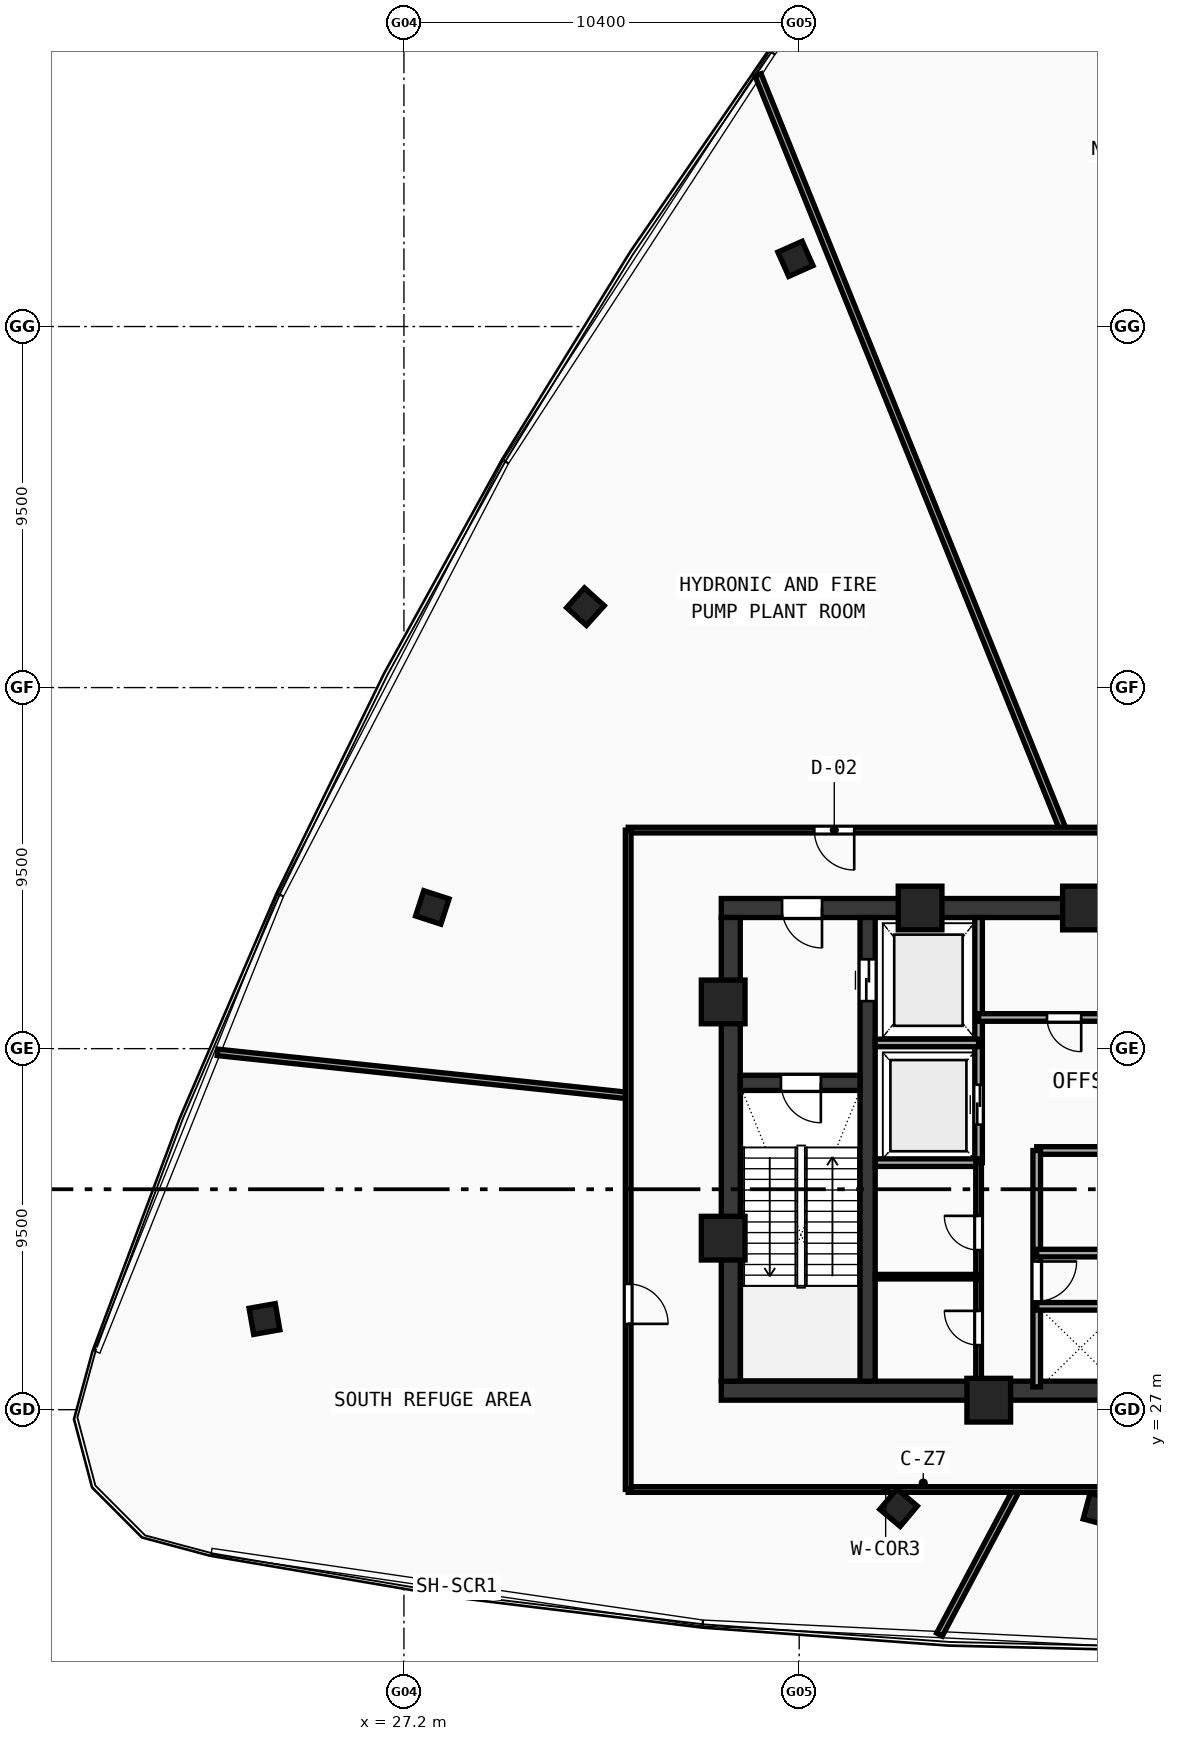
"""IFC4 building model, lengths in metres.
Left out: names, types, materials, properties, quantities, classifications, styles, units other than length and angle.
Written with IfcOpenShell. Run it as: python <this file> out.ifc"""

import sys

from ifc_helpers import new_model, si_unit, direction, frame, frame_2d, origin, origin_with_axes, origin_2d, place, context, subcontext, project, spatial, rectangle, hollow_rectangle, extrude, source, transform, mapped, element, fill, save


model = new_model("IFC4")
c1 = context("Model", 3, precision=1e-05, world=origin(), true_north=direction((0.0, 1.0)))
c2 = subcontext(c1, "Body", "Model", "MODEL_VIEW")
j1 = project(units=[si_unit("LENGTHUNIT", "METRE"), si_unit("PLANEANGLEUNIT", "RADIAN")], contexts=[c1])
p1 = place(None, origin())
s1 = spatial("IfcSite", under=j1, at=p1, CompositionType="ELEMENT")
p2 = place(p1, origin())
s2 = spatial("IfcBuilding", under=s1, at=p2, CompositionType="ELEMENT")
p3 = place(p2, frame((0.0, 0.0, 320.71)))
s3 = spatial("IfcBuildingStorey", under=s2, at=p3, CompositionType="ELEMENT", Elevation=320.71)
p4 = place(p3, frame((35.55, 27.5, 0.0), z_axis=(0.0, 0.0, 1.0), x_axis=(1.0, 0.0, 0.0)))
e1 = element("IfcWall", 1, at=p4, inside=s3, PredefinedType="SHEAR", context=c2, shape_type="SweptSolid", body=[
    extrude(rectangle(XDim=24.9, YDim=0.5, at=frame_2d((12.45, 0.0))), origin(), (0.0, 0.0, 1.0), 4.54),
])
p5 = place(p3, frame((35.55, 40.2, 0.0), z_axis=(0.0, 0.0, 1.0), x_axis=(1.0, 0.0, 0.0)))
e2 = element("IfcWall", 2, at=p5, inside=s3, PredefinedType="SHEAR", context=c2, shape_type="SweptSolid", body=[
    extrude(rectangle(XDim=11.25, YDim=0.5, at=frame_2d((5.625, 0.0))), origin(), (0.0, 0.0, 1.0), 4.54),
])
p6 = place(p5, frame((1.6, 0.0, 0.0)))
e3 = element("IfcOpeningElement", 3, at=p6, cuts=e2, PredefinedType="OPENING", context=c2, shape_type="SweptSolid", body=[
    extrude(rectangle(XDim=1.05, YDim=2.1, at=frame_2d((0.525, 1.05))), frame((0.0, 0.26, 0.0), z_axis=(0.0, -1.0, 0.0), x_axis=(1.0, 0.0, 0.0)), (0.0, 0.0, 1.0), 0.52),
])
p7 = place(p3, frame((35.8, 27.75, 0.0), z_axis=(0.0, 0.0, 1.0), x_axis=(0.0, 1.0, 0.0)))
e4 = element("IfcWall", 4, at=p7, inside=s3, PredefinedType="SHEAR", context=c2, shape_type="SweptSolid", body=[
    extrude(rectangle(XDim=12.2, YDim=0.5, at=frame_2d((6.1, 0.0))), origin(), (0.0, 0.0, 1.0), 4.54),
])
p8 = place(p3, frame((39.4, 27.75, 0.0), z_axis=(0.0, 0.0, 1.0), x_axis=(0.0, 1.0, 0.0)))
e5 = element("IfcWall", 5, at=p8, inside=s3, PredefinedType="SHEAR", context=c2, shape_type="SweptSolid", body=[
    extrude(rectangle(XDim=12.2, YDim=0.4, at=frame_2d((6.1, 0.0))), origin(), (0.0, 0.0, 1.0), 4.54),
])
p9 = place(p8, frame((10.0, 0.0, 0.0)))
e6 = element("IfcOpeningElement", 6, at=p9, cuts=e5, PredefinedType="OPENING", context=c2, shape_type="SweptSolid", body=[
    extrude(rectangle(XDim=1.1, YDim=2.1, at=frame_2d((0.55, 1.05))), frame((0.0, 0.21, 0.0), z_axis=(0.0, -1.0, 0.0), x_axis=(1.0, 0.0, 0.0)), (0.0, 0.0, 1.0), 0.42),
])
p10 = place(p3, frame((36.05, 35.6, 0.0), z_axis=(0.0, 0.0, 1.0), x_axis=(1.0, 0.0, 0.0)))
e7 = element("IfcWall", 7, at=p10, inside=s3, PredefinedType="SHEAR", context=c2, shape_type="SweptSolid", body=[
    extrude(rectangle(XDim=3.15, YDim=0.4, at=frame_2d((1.575, 0.0))), origin(), (0.0, 0.0, 1.0), 4.54),
])
p11 = place(p10, frame((1.07, 0.0, 0.0)))
e8 = element("IfcOpeningElement", 8, at=p11, cuts=e7, PredefinedType="OPENING", context=c2, shape_type="SweptSolid", body=[
    extrude(rectangle(XDim=1.05, YDim=2.1, at=frame_2d((0.525, 1.05))), frame((0.0, 0.21, 0.0), z_axis=(0.0, -1.0, 0.0), x_axis=(1.0, 0.0, 0.0)), (0.0, 0.0, 1.0), 0.42),
])
m1 = source(origin(), c2, "Body", "SweptSolid", [
    extrude(hollow_rectangle(XDim=1.15, YDim=1.15, WallThickness=0.048, at=origin_2d()), origin(), (0.0, 0.0, 1.0), 4.82),
])
for number, where, z_axis, x_axis in (
    (9, (42.588, 27.25, -0.28), (0.0, 0.0, 1.0), (1.0, 0.0, 0.0)),
    (10, (45.106, 40.2, -0.28), (0.0, 0.0, 1.0), (1.0, 0.0, 0.0)),
    (11, (40.781, 40.2, -0.28), (0.0, 0.0, 1.0), (1.0, 0.0, 0.0)),
    (12, (35.6, 37.729, -0.28), (0.0, 0.0, 1.0), (1.0, 0.0, 0.0)),
    (13, (35.6, 31.513, -0.28), (0.0, 0.0, 1.0), (1.0, 0.0, 0.0)),
):
    element("IfcColumn", number, at=place(p3, frame(where, z_axis=z_axis, x_axis=x_axis)), inside=s3, PredefinedType="COLUMN", context=c2, shape_type="MappedRepresentation", body=[
        mapped(m1, transform((0.0, 0.0, 0.0), scale=1.0)),
    ])
m2 = source(origin(), c2, "Body", "SweptSolid", [
    extrude(hollow_rectangle(XDim=0.7, YDim=0.7, WallThickness=0.026, at=origin_2d()), origin(), (0.0, 0.0, 1.0), 4.82),
])
for number, where, z_axis, x_axis in (
    (14, (40.215, 24.422, -0.28), (0.0, 0.0, 1.0), (0.766, -0.643, 0.0)),
    (15, (45.501, 24.373, -0.28), (0.0, 0.0, 1.0), (0.966, -0.259, 0.0)),
    (16, (37.501, 57.281, -0.28), (0.0, 0.0, 1.0), (-0.914, -0.407, 0.0)),
    (17, (31.975, 48.129, -0.28), (0.0, 0.0, 1.0), (-0.669, -0.743, 0.0)),
    (18, (27.947, 40.216, -0.28), (0.0, 0.0, 1.0), (-0.309, -0.951, 0.0)),
    (19, (23.53, 29.385, -0.28), (0.0, 0.0, 1.0), (0.174, -0.985, 0.0)),
):
    element("IfcColumn", number, at=place(p3, frame(where, z_axis=z_axis, x_axis=x_axis)), inside=s3, PredefinedType="COLUMN", context=c2, shape_type="MappedRepresentation", body=[
        mapped(m2, transform((0.0, 0.0, 0.0), scale=1.0)),
    ])
p12 = place(p3, frame((42.32, 33.5, 0.0), z_axis=(0.0, 0.0, 1.0), x_axis=(0.0, 1.0, 0.0)))
e20 = element("IfcWall", 20, at=p12, inside=s3, PredefinedType="SOLIDWALL", context=c2, shape_type="SweptSolid", body=[
    extrude(rectangle(XDim=6.45, YDim=0.2, at=frame_2d((3.225, 0.0))), origin(), (0.0, 0.0, 1.0), 4.54),
])
p13 = place(p12, frame((1.0, 0.0, 0.0)))
e21 = element("IfcOpeningElement", 21, at=p13, cuts=e20, PredefinedType="OPENING", context=c2, shape_type="SweptSolid", body=[
    extrude(rectangle(XDim=1.05, YDim=2.1, at=frame_2d((0.525, 1.05))), frame((0.0, 0.11, 0.0), z_axis=(0.0, -1.0, 0.0), x_axis=(1.0, 0.0, 0.0)), (0.0, 0.0, 1.0), 0.22),
])
for number, where, z_axis, x_axis in (
    (22, (39.6, 36.65, 0.0), (0.0, 0.0, 1.0), (1.0, 0.0, 0.0)),
    (23, (39.6, 33.5, 0.0), (0.0, 0.0, 1.0), (1.0, 0.0, 0.0)),
):
    element("IfcWall", number, at=place(p3, frame(where, z_axis=z_axis, x_axis=x_axis)), inside=s3, PredefinedType="SOLIDWALL", context=c2, shape_type="SweptSolid", body=[
        extrude(rectangle(XDim=2.72, YDim=0.2, at=frame_2d((1.36, 0.0))), origin(), (0.0, 0.0, 1.0), 4.54),
    ])
p14 = place(p3, frame((42.32, 37.32, 0.0), z_axis=(0.0, 0.0, 1.0), x_axis=(1.0, 0.0, 0.0)))
e24 = element("IfcWall", 24, at=p14, inside=s3, PredefinedType="SOLIDWALL", context=c2, shape_type="SweptSolid", body=[
    extrude(rectangle(XDim=4.73, YDim=0.2, at=frame_2d((2.365, 0.0))), origin(), (0.0, 0.0, 1.0), 4.54),
])
p15 = place(p14, frame((1.8, 0.0, 0.0)))
e25 = element("IfcOpeningElement", 25, at=p15, cuts=e24, PredefinedType="OPENING", context=c2, shape_type="SweptSolid", body=[
    extrude(rectangle(XDim=0.9, YDim=2.1, at=frame_2d((0.45, 1.05))), frame((0.0, 0.11, 0.0), z_axis=(0.0, -1.0, 0.0), x_axis=(1.0, 0.0, 0.0)), (0.0, 0.0, 1.0), 0.22),
])
p16 = place(p3, frame((43.85, 33.82, 0.0), z_axis=(0.0, 0.0, 1.0), x_axis=(1.0, 0.0, 0.0)))
e26 = element("IfcWall", 26, at=p16, inside=s3, PredefinedType="SOLIDWALL", context=c2, shape_type="SweptSolid", body=[
    extrude(rectangle(XDim=9.83, YDim=0.2, at=frame_2d((4.915, 0.0))), origin(), (0.0, 0.0, 1.0), 4.54),
])
p17 = place(p16, frame((4.2, 0.0, 0.0)))
e27 = element("IfcOpeningElement", 27, at=p17, cuts=e26, PredefinedType="OPENING", context=c2, shape_type="SweptSolid", body=[
    extrude(rectangle(XDim=0.9, YDim=2.1, at=frame_2d((0.45, 1.05))), frame((0.0, 0.11, 0.0), z_axis=(0.0, -1.0, 0.0), x_axis=(1.0, 0.0, 0.0)), (0.0, 0.0, 1.0), 0.22),
])
p18 = place(p3, frame((43.85, 27.6, 0.0), z_axis=(0.0, 0.0, 1.0), x_axis=(0.0, 1.0, 0.0)))
e28 = element("IfcWall", 28, at=p18, inside=s3, PredefinedType="SOLIDWALL", context=c2, shape_type="SweptSolid", body=[
    extrude(rectangle(XDim=6.22, YDim=0.2, at=frame_2d((3.11, 0.0))), origin(), (0.0, 0.0, 1.0), 4.54),
])
p19 = place(p18, frame((2.25, 0.0, 0.0)))
e29 = element("IfcOpeningElement", 29, at=p19, cuts=e28, PredefinedType="OPENING", context=c2, shape_type="SweptSolid", body=[
    extrude(rectangle(XDim=1.05, YDim=2.1, at=frame_2d((0.525, 1.05))), frame((0.0, 0.11, 0.0), z_axis=(0.0, -1.0, 0.0), x_axis=(1.0, 0.0, 0.0)), (0.0, 0.0, 1.0), 0.22),
])
p20 = place(p3, frame((43.85, 29.72, 0.0), z_axis=(0.0, 0.0, 1.0), x_axis=(1.0, 0.0, 0.0)))
e30 = element("IfcWall", 30, at=p20, inside=s3, PredefinedType="SOLIDWALL", context=c2, shape_type="SweptSolid", body=[
    extrude(rectangle(XDim=7.2, YDim=0.2, at=frame_2d((3.6, 0.0))), origin(), (0.0, 0.0, 1.0), 4.54),
])
p21 = place(p3, frame((43.85, 31.12, 0.0), z_axis=(0.0, 0.0, 1.0), x_axis=(1.0, 0.0, 0.0)))
e31 = element("IfcWall", 31, at=p21, inside=s3, PredefinedType="SOLIDWALL", context=c2, shape_type="SweptSolid", body=[
    extrude(rectangle(XDim=9.83, YDim=0.2, at=frame_2d((4.915, 0.0))), origin(), (0.0, 0.0, 1.0), 4.54),
])
p22 = place(p3, frame((42.32, 27.6, 0.0), z_axis=(0.0, 0.0, 1.0), x_axis=(0.0, 1.0, 0.0)))
e32 = element("IfcWall", 32, at=p22, inside=s3, PredefinedType="PARTITIONING", context=c2, shape_type="SweptSolid", body=[
    extrude(rectangle(XDim=5.9, YDim=0.15, at=frame_2d((2.95, 0.0))), origin(), (0.0, 0.0, 1.0), 4.54),
])
p23 = place(p22, frame((1.1, 0.0, 0.0)))
e33 = element("IfcOpeningElement", 33, at=p23, cuts=e32, PredefinedType="OPENING", context=c2, shape_type="SweptSolid", body=[
    extrude(rectangle(XDim=0.9, YDim=2.1, at=frame_2d((0.45, 1.05))), frame((0.0, 0.085, 0.0), z_axis=(0.0, -1.0, 0.0), x_axis=(1.0, 0.0, 0.0)), (0.0, 0.0, 1.0), 0.17),
])
p24 = place(p22, frame((3.6, 0.0, 0.0)))
e34 = element("IfcOpeningElement", 34, at=p24, cuts=e32, PredefinedType="OPENING", context=c2, shape_type="SweptSolid", body=[
    extrude(rectangle(XDim=0.9, YDim=2.1, at=frame_2d((0.45, 1.05))), frame((0.0, 0.085, 0.0), z_axis=(0.0, -1.0, 0.0), x_axis=(1.0, 0.0, 0.0)), (0.0, 0.0, 1.0), 0.17),
])
p25 = place(p3, frame((39.6, 30.5, 0.0), z_axis=(0.0, 0.0, 1.0), x_axis=(1.0, 0.0, 0.0)))
e35 = element("IfcWall", 35, at=p25, inside=s3, PredefinedType="PARTITIONING", context=c2, shape_type="SweptSolid", body=[
    extrude(rectangle(XDim=2.72, YDim=0.12, at=frame_2d((1.36, 0.0))), origin(), (0.0, 0.0, 1.0), 4.54),
])
p26 = place(p3, frame((44.546, 42.25, 0.0), z_axis=(0.0, 0.0, 1.0), x_axis=(-0.374603551527, 0.927185083564, 0.0)))
e36 = element("IfcWall", 36, at=p26, inside=s3, PredefinedType="PARTITIONING", context=c2, shape_type="SweptSolid", body=[
    extrude(rectangle(XDim=21.432, YDim=0.17, at=frame_2d((10.716, 0.0))), origin(), (0.0, 0.0, 1.0), 3.94),
])
p27 = place(p3, frame((33.1, 35.266, 0.0), z_axis=(0.0, 0.0, 1.0), x_axis=(-0.994523538022, 0.104512833281, 0.0)))
e37 = element("IfcWall", 37, at=p27, inside=s3, PredefinedType="PARTITIONING", context=c2, shape_type="SweptSolid", body=[
    extrude(rectangle(XDim=10.865, YDim=0.17, at=frame_2d((5.432, 0.0))), origin(), (0.0, 0.0, 1.0), 3.94),
])
p28 = place(p3, frame((43.321, 24.9, 0.0), z_axis=(0.0, 0.0, 1.0), x_axis=(-0.469500598457, -0.882932153706, 0.0)))
e38 = element("IfcWall", 38, at=p28, inside=s3, PredefinedType="PARTITIONING", context=c2, shape_type="SweptSolid", body=[
    extrude(rectangle(XDim=4.324, YDim=0.17, at=frame_2d((2.162, 0.0))), origin(), (0.0, 0.0, 1.0), 3.94),
])
p29 = place(p3, frame((33.1, 24.9, 0.0), z_axis=(0.0, 0.0, 1.0), x_axis=(1.0, 0.0, 0.0)))
e39 = element("IfcWall", 39, at=p29, inside=s3, PredefinedType="PARTITIONING", context=c2, shape_type="SweptSolid", body=[
    extrude(rectangle(XDim=29.8, YDim=0.15, at=frame_2d((14.9, 0.0))), origin(), (0.0, 0.0, 1.0), 3.94),
])
p30 = place(p29, frame((14.375, 0.0, 0.0)))
e40 = element("IfcOpeningElement", 40, at=p30, cuts=e39, PredefinedType="OPENING", context=c2, shape_type="SweptSolid", body=[
    extrude(rectangle(XDim=1.05, YDim=2.1, at=frame_2d((0.525, 1.05))), frame((0.0, 0.085, 0.0), z_axis=(0.0, -1.0, 0.0), x_axis=(1.0, 0.0, 0.0)), (0.0, 0.0, 1.0), 0.17),
])
p31 = place(p3, frame((62.9, 42.25, 0.0), z_axis=(0.0, 0.0, 1.0), x_axis=(-1.0, 0.0, 0.0)))
e41 = element("IfcWall", 41, at=p31, inside=s3, PredefinedType="PARTITIONING", context=c2, shape_type="SweptSolid", body=[
    extrude(rectangle(XDim=29.8, YDim=0.15, at=frame_2d((14.9, 0.0))), origin(), (0.0, 0.0, 1.0), 3.94),
])
p32 = place(p31, frame((4.898, 0.0, 0.0)))
e42 = element("IfcOpeningElement", 42, at=p32, cuts=e41, PredefinedType="OPENING", context=c2, shape_type="SweptSolid", body=[
    extrude(rectangle(XDim=1.05, YDim=2.1, at=frame_2d((0.525, 1.05))), frame((0.0, 0.085, 0.0), z_axis=(0.0, -1.0, 0.0), x_axis=(1.0, 0.0, 0.0)), (0.0, 0.0, 1.0), 0.17),
])
p33 = place(p31, frame((14.375, 0.0, 0.0)))
e43 = element("IfcOpeningElement", 43, at=p33, cuts=e41, PredefinedType="OPENING", context=c2, shape_type="SweptSolid", body=[
    extrude(rectangle(XDim=1.05, YDim=2.1, at=frame_2d((0.525, 1.05))), frame((0.0, 0.085, 0.0), z_axis=(0.0, -1.0, 0.0), x_axis=(1.0, 0.0, 0.0)), (0.0, 0.0, 1.0), 0.17),
])
p34 = place(p31, frame((23.852, 0.0, 0.0)))
e44 = element("IfcOpeningElement", 44, at=p34, cuts=e41, PredefinedType="OPENING", context=c2, shape_type="SweptSolid", body=[
    extrude(rectangle(XDim=1.05, YDim=2.1, at=frame_2d((0.525, 1.05))), frame((0.0, 0.085, 0.0), z_axis=(0.0, -1.0, 0.0), x_axis=(1.0, 0.0, 0.0)), (0.0, 0.0, 1.0), 0.17),
])
p35 = place(p3, frame((33.1, 42.25, 0.0), z_axis=(0.0, 0.0, 1.0), x_axis=(0.0, -1.0, 0.0)))
e45 = element("IfcWall", 45, at=p35, inside=s3, PredefinedType="PARTITIONING", context=c2, shape_type="SweptSolid", body=[
    extrude(rectangle(XDim=17.35, YDim=0.15, at=frame_2d((8.675, 0.0))), origin(), (0.0, 0.0, 1.0), 3.94),
])
p36 = place(p35, frame((11.942, 0.0, 0.0)))
e46 = element("IfcOpeningElement", 46, at=p36, cuts=e45, PredefinedType="OPENING", context=c2, shape_type="SweptSolid", body=[
    extrude(rectangle(XDim=1.05, YDim=2.1, at=frame_2d((0.525, 1.05))), frame((0.0, 0.085, 0.0), z_axis=(0.0, -1.0, 0.0), x_axis=(1.0, 0.0, 0.0)), (0.0, 0.0, 1.0), 0.17),
])
m3 = source(origin(), c2, "Body", "SweptSolid", [
    extrude(rectangle(XDim=1.05, YDim=2.1, at=frame_2d((0.525, 1.05))), frame((0.0, 0.025, 0.0), z_axis=(0.0, -1.0, 0.0), x_axis=(1.0, 0.0, 0.0)), (0.0, 0.0, 1.0), 0.05),
])
p37 = place(p11, frame((1.05, 0.0, 0.0), z_axis=(0.0, 0.0, 1.0), x_axis=(-1.0, 0.0, 0.0)))
e47 = element("IfcDoor", 47, at=p37, inside=s3, OperationType="SINGLE_SWING_LEFT", PredefinedType="DOOR", context=c2, shape_type="MappedRepresentation", body=[
    mapped(m3, transform((0.0, 0.0, 0.0), scale=1.0)),
])
fill(e8, e47)
p38 = place(p6, frame((1.05, 0.0, 0.0), z_axis=(0.0, 0.0, 1.0), x_axis=(-1.0, 0.0, 0.0)))
e48 = element("IfcDoor", 48, at=p38, inside=s3, OperationType="SINGLE_SWING_LEFT", PredefinedType="DOOR", context=c2, shape_type="MappedRepresentation", body=[
    mapped(m3, transform((0.0, 0.0, 0.0), scale=1.0)),
])
fill(e3, e48)
m4 = source(origin(), c2, "Body", "SweptSolid", [
    extrude(rectangle(XDim=1.1, YDim=2.1, at=frame_2d((0.55, 1.05))), frame((0.0, 0.025, 0.0), z_axis=(0.0, -1.0, 0.0), x_axis=(1.0, 0.0, 0.0)), (0.0, 0.0, 1.0), 0.05),
])
p39 = place(p9, frame((1.1, 0.0, 0.0), z_axis=(0.0, 0.0, 1.0), x_axis=(-1.0, 0.0, 0.0)))
e49 = element("IfcDoor", 49, at=p39, inside=s3, OperationType="DOUBLE_DOOR_SLIDING", PredefinedType="DOOR", context=c2, shape_type="MappedRepresentation", body=[
    mapped(m4, transform((0.0, 0.0, 0.0), scale=1.0)),
])
fill(e6, e49)
p40 = place(p13, origin_with_axes())
e50 = element("IfcDoor", 50, at=p40, inside=s3, OperationType="DOUBLE_DOOR_SLIDING", PredefinedType="DOOR", context=c2, shape_type="MappedRepresentation", body=[
    mapped(m3, transform((0.0, 0.0, 0.0), scale=1.0)),
])
fill(e21, e50)
m5 = source(origin(), c2, "Body", "SweptSolid", [
    extrude(rectangle(XDim=0.9, YDim=2.1, at=frame_2d((0.45, 1.05))), frame((0.0, 0.025, 0.0), z_axis=(0.0, -1.0, 0.0), x_axis=(1.0, 0.0, 0.0)), (0.0, 0.0, 1.0), 0.05),
])
p41 = place(p15, frame((0.9, 0.0, 0.0), z_axis=(0.0, 0.0, 1.0), x_axis=(-1.0, 0.0, 0.0)))
e51 = element("IfcDoor", 51, at=p41, inside=s3, OperationType="SINGLE_SWING_LEFT", PredefinedType="DOOR", context=c2, shape_type="MappedRepresentation", body=[
    mapped(m5, transform((0.0, 0.0, 0.0), scale=1.0)),
])
fill(e25, e51)
p42 = place(p19, frame((1.05, 0.0, 0.0), z_axis=(0.0, 0.0, 1.0), x_axis=(-1.0, 0.0, 0.0)))
e52 = element("IfcDoor", 52, at=p42, inside=s3, OperationType="SINGLE_SWING_LEFT", PredefinedType="DOOR", context=c2, shape_type="MappedRepresentation", body=[
    mapped(m3, transform((0.0, 0.0, 0.0), scale=1.0)),
])
fill(e29, e52)
p43 = place(p23, origin_with_axes())
e53 = element("IfcDoor", 53, at=p43, inside=s3, OperationType="SINGLE_SWING_RIGHT", PredefinedType="DOOR", context=c2, shape_type="MappedRepresentation", body=[
    mapped(m5, transform((0.0, 0.0, 0.0), scale=1.0)),
])
fill(e33, e53)
p44 = place(p24, origin_with_axes())
e54 = element("IfcDoor", 54, at=p44, inside=s3, OperationType="SINGLE_SWING_RIGHT", PredefinedType="DOOR", context=c2, shape_type="MappedRepresentation", body=[
    mapped(m5, transform((0.0, 0.0, 0.0), scale=1.0)),
])
fill(e34, e54)
p45 = place(p34, origin_with_axes())
e55 = element("IfcDoor", 55, at=p45, inside=s3, OperationType="SINGLE_SWING_LEFT", PredefinedType="DOOR", context=c2, shape_type="MappedRepresentation", body=[
    mapped(m3, transform((0.0, 0.0, 0.0), scale=1.0)),
])
fill(e44, e55)
p46 = place(p36, origin_with_axes())
e56 = element("IfcDoor", 56, at=p46, inside=s3, OperationType="SINGLE_SWING_RIGHT", PredefinedType="DOOR", context=c2, shape_type="MappedRepresentation", body=[
    mapped(m3, transform((0.0, 0.0, 0.0), scale=1.0)),
])
fill(e46, e56)
save(model, sys.argv[1])
